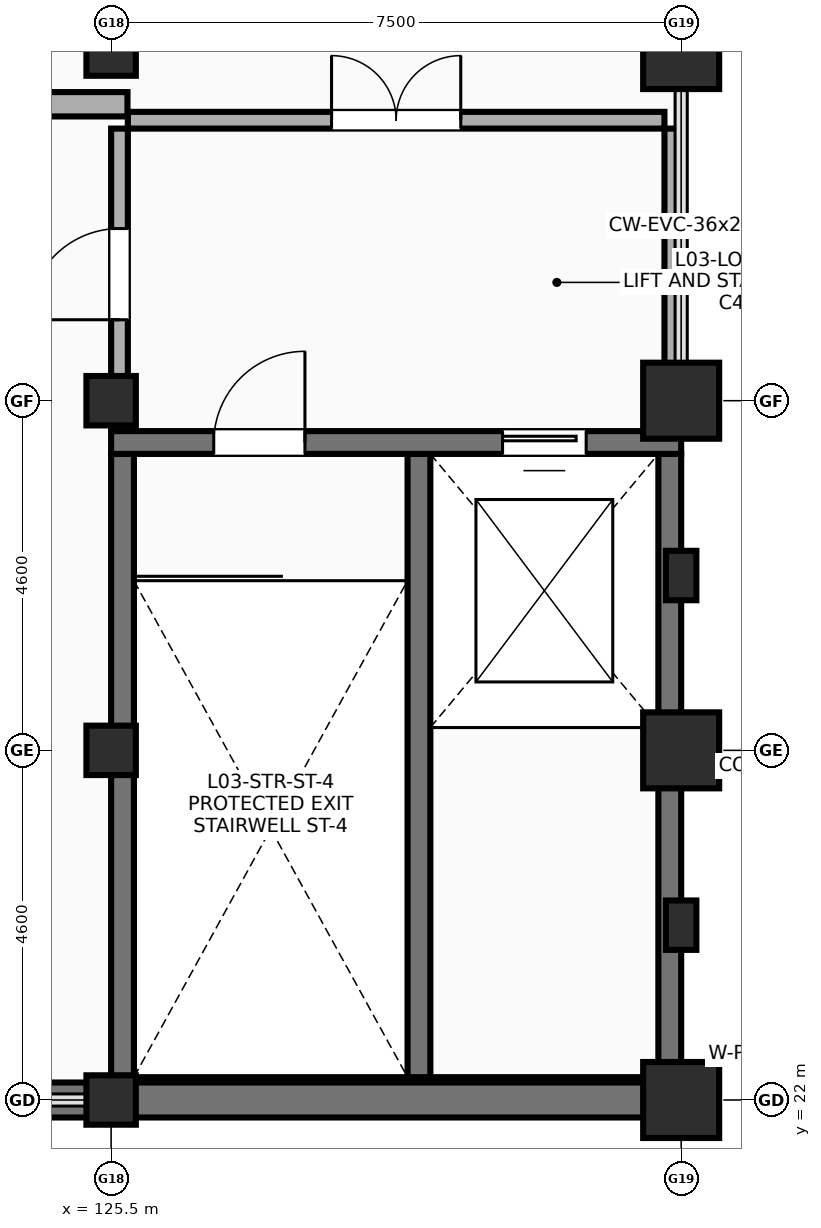
"""IFC4 building model, lengths in metres.
Left out: names, types, materials, properties, quantities, classifications, styles, units other than length and angle.
Written with IfcOpenShell. Run it as: python <this file> out.ifc"""

import sys

from ifc_helpers import new_model, si_unit, direction, frame, frame_2d, origin, origin_2d, place, context, subcontext, project, spatial, polyline, rectangle, outline, extrude, element, fill, save


model = new_model("IFC4")
c1 = context("Model", 3, precision=1e-05, world=origin(), true_north=direction((0.0, 1.0)))
c2 = subcontext(c1, "Body", "Model", "MODEL_VIEW")
j1 = project(units=[si_unit("LENGTHUNIT", "METRE"), si_unit("PLANEANGLEUNIT", "RADIAN")], contexts=[c1])
p1 = place(None, origin())
s1 = spatial("IfcSite", under=j1, at=p1, CompositionType="ELEMENT")
p2 = place(p1, origin())
s2 = spatial("IfcBuilding", under=s1, at=p2, CompositionType="ELEMENT")
p3 = place(p2, frame((0.0, 0.0, 14.2)))
s3 = spatial("IfcBuildingStorey", under=s2, at=p3, CompositionType="ELEMENT", Elevation=14.2)
for number, where, z_axis, x_axis in (
    (1, (125.5, 22.0, 0.0), (0.0, 0.0, 1.0), (1.0, 0.0, 0.0)),
    (2, (125.5, 26.6, 0.0), (0.0, 0.0, 1.0), (1.0, 0.0, 0.0)),
    (3, (125.5, 31.2, 0.0), (0.0, 0.0, 1.0), (1.0, 0.0, 0.0)),
    (4, (125.5, 35.8, 0.0), (0.0, 0.0, 1.0), (1.0, 0.0, 0.0)),
):
    element("IfcColumn", number, at=place(p3, frame(where, z_axis=z_axis, x_axis=x_axis)), inside=s3, PredefinedType="COLUMN", context=c2, shape_type="SweptSolid", body=[
        extrude(rectangle(XDim=0.65, YDim=0.65, at=origin_2d()), origin(), (0.0, 0.0, 1.0), 3.8),
    ])
for number, where, z_axis, x_axis in (
    (5, (133.0, 22.0, 0.0), (0.0, 0.0, 1.0), (1.0, 0.0, 0.0)),
    (6, (133.0, 26.6, 0.0), (0.0, 0.0, 1.0), (1.0, 0.0, 0.0)),
    (7, (133.0, 31.2, 0.0), (0.0, 0.0, 1.0), (1.0, 0.0, 0.0)),
    (8, (133.0, 35.8, 0.0), (0.0, 0.0, 1.0), (1.0, 0.0, 0.0)),
):
    element("IfcColumn", number, at=place(p3, frame(where, z_axis=z_axis, x_axis=x_axis)), inside=s3, PredefinedType="COLUMN", context=c2, shape_type="SweptSolid", body=[
        extrude(rectangle(XDim=1.0, YDim=1.0, at=origin_2d()), origin(), (0.0, 0.0, 1.0), 3.8),
    ])
for number, where, z_axis, x_axis in (
    (9, (133.0, 24.3, 0.0), (0.0, 0.0, 1.0), (1.0, 0.0, 0.0)),
    (10, (133.0, 28.9, 0.0), (0.0, 0.0, 1.0), (1.0, 0.0, 0.0)),
):
    element("IfcColumn", number, at=place(p3, frame(where, z_axis=z_axis, x_axis=x_axis)), inside=s3, PredefinedType="PILASTER", context=c2, shape_type="SweptSolid", body=[
        extrude(rectangle(XDim=0.4, YDim=0.65, at=origin_2d()), origin(), (0.0, 0.0, 1.0), 3.8),
    ])
p4 = place(p3, frame((125.5, 22.15, 0.0), z_axis=(0.0, 0.0, 1.0), x_axis=(1.0, 0.0, 0.0)))
e11 = element("IfcWall", 11, at=p4, inside=s3, PredefinedType="SHEAR", context=c2, shape_type="SweptSolid", body=[
    extrude(rectangle(XDim=7.5, YDim=0.3, at=frame_2d((3.75, 0.0))), origin(), (0.0, 0.0, 1.0), 3.8),
])
for number, where, z_axis, x_axis in (
    (12, (125.65, 22.3, 0.0), (0.0, 0.0, 1.0), (0.0, 1.0, 0.0)),
    (13, (132.85, 22.3, 0.0), (0.0, 0.0, 1.0), (0.0, 1.0, 0.0)),
    (14, (129.55, 22.3, 0.0), (0.0, 0.0, 1.0), (0.0, 1.0, 0.0)),
):
    element("IfcWall", number, at=place(p3, frame(where, z_axis=z_axis, x_axis=x_axis)), inside=s3, PredefinedType="SHEAR", context=c2, shape_type="SweptSolid", body=[
        extrude(rectangle(XDim=8.2, YDim=0.3, at=frame_2d((4.1, 0.0))), origin(), (0.0, 0.0, 1.0), 3.8),
    ])
p5 = place(p3, frame((103.14, 22.0, 3.8), z_axis=(0.0, 0.0, 1.0), x_axis=(1.0, 0.0, 0.0)))
e15 = element("IfcWall", 15, at=p5, inside=s3, PredefinedType="SOLIDWALL", context=c2, shape_type="SweptSolid", body=[
    extrude(outline(polyline([(0.0, 0.0), (29.72, 0.0), (29.72, 2.177), (28.877, 3.859), (28.092, 5.46), (27.125, 6.958), (25.99, 8.333), (24.701, 9.565), (23.277, 10.637), (21.737, 11.536), (20.102, 12.248), (18.395, 12.763), (16.64, 13.076), (14.86, 13.18), (13.08, 13.076), (11.325, 12.763), (9.618, 12.248), (7.983, 11.536), (6.443, 10.637), (5.019, 9.565), (3.73, 8.333), (2.595, 6.958), (1.628, 5.46), (0.843, 3.859), (0.0, 2.177), (0.0, 0.0)])), frame((0.0, 0.23, 0.0), z_axis=(0.0, -1.0, 0.0), x_axis=(1.0, 0.0, 0.0)), (0.0, 0.0, 1.0), 0.46),
])
p6 = place(p5, frame((11.86, 0.0, 3.6)))
e16 = element("IfcOpeningElement", 16, at=p6, cuts=e15, PredefinedType="OPENING", context=c2, shape_type="SweptSolid", body=[
    extrude(outline(polyline([(6.0, 3.0), (5.898, 3.776), (5.598, 4.5), (5.121, 5.121), (4.5, 5.598), (3.776, 5.898), (3.0, 6.0), (2.224, 5.898), (1.5, 5.598), (0.879, 5.121), (0.402, 4.5), (0.102, 3.776), (0.0, 3.0), (0.102, 2.224), (0.402, 1.5), (0.879, 0.879), (1.5, 0.402), (2.224, 0.102), (3.0, 0.0), (3.776, 0.102), (4.5, 0.402), (5.121, 0.879), (5.598, 1.5), (5.898, 2.224), (6.0, 3.0)])), frame((0.0, 0.24, 0.0), z_axis=(0.0, -1.0, 0.0), x_axis=(1.0, 0.0, 0.0)), (0.0, 0.0, 1.0), 0.48),
])
p7 = place(p3, frame((125.5, 30.65, 0.0), z_axis=(0.0, 0.0, 1.0), x_axis=(1.0, 0.0, 0.0)))
e17 = element("IfcWall", 17, at=p7, inside=s3, PredefinedType="SHEAR", context=c2, shape_type="SweptSolid", body=[
    extrude(rectangle(XDim=7.5, YDim=0.3, at=frame_2d((3.75, 0.0))), origin(), (0.0, 0.0, 1.0), 3.8),
])
p8 = place(p7, frame((1.35, 0.0, 0.0)))
e18 = element("IfcOpeningElement", 18, at=p8, cuts=e17, PredefinedType="OPENING", context=c2, shape_type="SweptSolid", body=[
    extrude(rectangle(XDim=1.2, YDim=2.15, at=frame_2d((0.6, 1.075))), frame((0.0, 0.16, 0.0), z_axis=(0.0, -1.0, 0.0), x_axis=(1.0, 0.0, 0.0)), (0.0, 0.0, 1.0), 0.32),
])
p9 = place(p7, frame((5.15, 0.0, 0.0)))
e19 = element("IfcOpeningElement", 19, at=p9, cuts=e17, PredefinedType="OPENING", context=c2, shape_type="SweptSolid", body=[
    extrude(rectangle(XDim=1.1, YDim=2.15, at=frame_2d((0.55, 1.075))), frame((0.0, 0.16, 0.0), z_axis=(0.0, -1.0, 0.0), x_axis=(1.0, 0.0, 0.0)), (0.0, 0.0, 1.0), 0.32),
])
p10 = place(p3, frame((125.72, 34.89, 0.0), z_axis=(0.0, 0.0, 1.0), x_axis=(1.0, 0.0, 0.0)))
e20 = element("IfcWall", 20, at=p10, inside=s3, PredefinedType="SOLIDWALL", context=c2, shape_type="SweptSolid", body=[
    extrude(rectangle(XDim=7.06, YDim=0.22, at=frame_2d((3.53, 0.0))), origin(), (0.0, 0.0, 1.0), 2.38),
])
p11 = place(p10, frame((2.68, 0.0, 0.0)))
e21 = element("IfcOpeningElement", 21, at=p11, cuts=e20, PredefinedType="OPENING", context=c2, shape_type="SweptSolid", body=[
    extrude(rectangle(XDim=1.7, YDim=2.18, at=frame_2d((0.85, 1.09))), frame((0.0, 0.12, 0.0), z_axis=(0.0, -1.0, 0.0), x_axis=(1.0, 0.0, 0.0)), (0.0, 0.0, 1.0), 0.24),
])
p12 = place(p3, frame((125.61, 30.95, 0.0), z_axis=(0.0, 0.0, 1.0), x_axis=(0.0, 1.0, 0.0)))
e22 = element("IfcWall", 22, at=p12, inside=s3, PredefinedType="SOLIDWALL", context=c2, shape_type="SweptSolid", body=[
    extrude(rectangle(XDim=3.83, YDim=0.22, at=frame_2d((1.915, 0.0))), origin(), (0.0, 0.0, 1.0), 2.7),
])
p13 = place(p12, frame((1.315, 0.0, 0.0)))
e23 = element("IfcOpeningElement", 23, at=p13, cuts=e22, PredefinedType="OPENING", context=c2, shape_type="SweptSolid", body=[
    extrude(rectangle(XDim=1.2, YDim=2.15, at=frame_2d((0.6, 1.075))), frame((0.0, 0.12, 0.0), z_axis=(0.0, -1.0, 0.0), x_axis=(1.0, 0.0, 0.0)), (0.0, 0.0, 1.0), 0.24),
])
p14 = place(p3, frame((132.89, 30.95, 0.0), z_axis=(0.0, 0.0, 1.0), x_axis=(0.0, 1.0, 0.0)))
e24 = element("IfcWall", 24, at=p14, inside=s3, PredefinedType="SOLIDWALL", context=c2, shape_type="SweptSolid", body=[
    extrude(rectangle(XDim=3.83, YDim=0.22, at=frame_2d((1.915, 0.0))), origin(), (0.0, 0.0, 1.0), 2.38),
])
p15 = place(p3, frame((108.245, 35.1, 0.0), z_axis=(0.0, 0.0, 1.0), x_axis=(1.0, 0.0, 0.0)))
e25 = element("IfcWall", 25, at=p15, inside=s3, PredefinedType="PARTITIONING", context=c2, shape_type="SweptSolid", body=[
    extrude(rectangle(XDim=17.47, YDim=0.32, at=frame_2d((8.735, 0.0))), origin(), (0.0, 0.0, 1.0), 2.9),
])
p16 = place(p15, frame((6.68, 0.0, 0.0)))
e26 = element("IfcOpeningElement", 26, at=p16, cuts=e25, PredefinedType="OPENING", context=c2, shape_type="SweptSolid", body=[
    extrude(rectangle(XDim=2.4, YDim=2.6, at=frame_2d((1.2, 1.3))), frame((0.0, 0.17, 0.0), z_axis=(0.0, -1.0, 0.0), x_axis=(1.0, 0.0, 0.0)), (0.0, 0.0, 1.0), 0.34),
])
p17 = place(p8, origin())
e27 = element("IfcDoor", 27, at=p17, inside=s3, OperationType="SINGLE_SWING_RIGHT", PredefinedType="DOOR", context=c2, shape_type="SweptSolid", body=[
    extrude(rectangle(XDim=1.2, YDim=2.15, at=frame_2d((0.6, 1.075))), frame((0.0, 0.025, 0.0), z_axis=(0.0, -1.0, 0.0), x_axis=(1.0, 0.0, 0.0)), (0.0, 0.0, 1.0), 0.05),
])
fill(e18, e27)
p18 = place(p9, origin())
e28 = element("IfcDoor", 28, at=p18, inside=s3, OperationType="SLIDING_TO_LEFT", PredefinedType="DOOR", context=c2, shape_type="SweptSolid", body=[
    extrude(rectangle(XDim=1.1, YDim=2.15, at=frame_2d((0.55, 1.075))), frame((0.0, 0.025, 0.0), z_axis=(0.0, -1.0, 0.0), x_axis=(1.0, 0.0, 0.0)), (0.0, 0.0, 1.0), 0.05),
])
fill(e19, e28)
p19 = place(p11, origin())
e29 = element("IfcDoor", 29, at=p19, inside=s3, OperationType="DOUBLE_DOOR_SINGLE_SWING", PredefinedType="DOOR", context=c2, shape_type="SweptSolid", body=[
    extrude(rectangle(XDim=1.7, YDim=2.18, at=frame_2d((0.85, 1.09))), frame((0.0, 0.025, 0.0), z_axis=(0.0, -1.0, 0.0), x_axis=(1.0, 0.0, 0.0)), (0.0, 0.0, 1.0), 0.05),
])
fill(e21, e29)
p20 = place(p13, origin())
e30 = element("IfcDoor", 30, at=p20, inside=s3, OperationType="SINGLE_SWING_LEFT", PredefinedType="DOOR", context=c2, shape_type="SweptSolid", body=[
    extrude(rectangle(XDim=1.2, YDim=2.15, at=frame_2d((0.6, 1.075))), frame((0.0, 0.025, 0.0), z_axis=(0.0, -1.0, 0.0), x_axis=(1.0, 0.0, 0.0)), (0.0, 0.0, 1.0), 0.05),
])
fill(e23, e30)
save(model, sys.argv[1])
